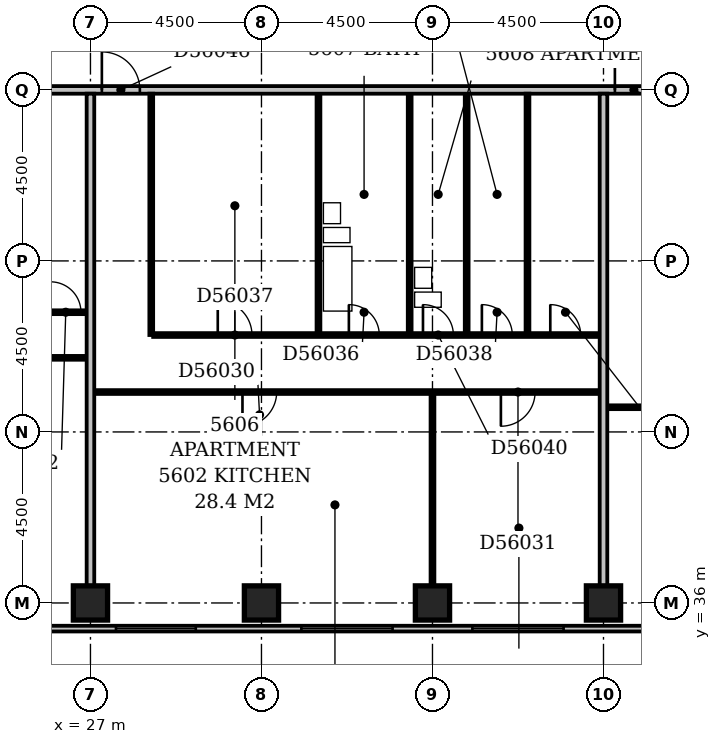
"""IFC4 building model, lengths in metres.
Left out: names, types, materials, properties, quantities, classifications, styles, units other than length and angle.
Written with IfcOpenShell. Run it as: python <this file> out.ifc"""

import sys

from ifc_helpers import new_model, si_unit, direction, frame, frame_2d, origin, origin_2d, place, context, subcontext, project, spatial, rectangle, extrude, element, fill, save


model = new_model("IFC4")
c1 = context("Model", 3, precision=1e-05, world=origin(), true_north=direction((0.0, 1.0)))
c2 = subcontext(c1, "Body", "Model", "MODEL_VIEW")
j1 = project(units=[si_unit("LENGTHUNIT", "METRE"), si_unit("PLANEANGLEUNIT", "RADIAN")], contexts=[c1])
p1 = place(None, origin())
s1 = spatial("IfcSite", under=j1, at=p1, CompositionType="ELEMENT")
p2 = place(p1, origin())
s2 = spatial("IfcBuilding", under=s1, at=p2, CompositionType="ELEMENT")
p3 = place(p2, frame((0.0, 0.0, 218.6)))
s3 = spatial("IfcBuildingStorey", under=s2, at=p3, CompositionType="ELEMENT", Elevation=218.6)
for number, where, z_axis, x_axis in (
    (1, (27.0, 36.0, -0.3), (0.0, 0.0, 1.0), (1.0, 0.0, 0.0)),
    (2, (31.5, 36.0, -0.3), (0.0, 0.0, 1.0), (1.0, 0.0, 0.0)),
    (3, (36.0, 36.0, -0.3), (0.0, 0.0, 1.0), (1.0, 0.0, 0.0)),
    (4, (40.5, 36.0, -0.3), (0.0, 0.0, 1.0), (1.0, 0.0, 0.0)),
):
    element("IfcColumn", number, at=place(p3, frame(where, z_axis=z_axis, x_axis=x_axis)), inside=s3, PredefinedType="COLUMN", context=c2, shape_type="SweptSolid", body=[
        extrude(rectangle(XDim=0.9, YDim=0.9, at=origin_2d()), origin(), (0.0, 0.0, 1.0), 3.6),
    ])
p4 = place(p3, frame((23.1, 35.325, 0.0), z_axis=(0.0, 0.0, 1.0), x_axis=(1.0, 0.0, 0.0)))
e5 = element("IfcWall", 5, at=p4, inside=s3, PredefinedType="STANDARD", context=c2, shape_type="SweptSolid", body=[
    extrude(rectangle(XDim=27.15, YDim=0.15, at=frame_2d((13.575, 0.0))), origin(), (0.0, 0.0, 1.0), 2.7),
])
p5 = place(p4, frame((0.45, 0.0, 0.6)))
e6 = element("IfcOpeningElement", 6, at=p5, cuts=e5, PredefinedType="OPENING", context=c2, shape_type="SweptSolid", body=[
    extrude(rectangle(XDim=2.4, YDim=1.8, at=frame_2d((1.2, 0.9))), frame((0.0, 0.087, 0.0), z_axis=(0.0, -1.0, 0.0), x_axis=(1.0, 0.0, 0.0)), (0.0, 0.0, 1.0), 0.174),
])
p6 = place(p4, frame((4.571, 0.0, 0.6)))
e7 = element("IfcOpeningElement", 7, at=p6, cuts=e5, PredefinedType="OPENING", context=c2, shape_type="SweptSolid", body=[
    extrude(rectangle(XDim=2.1, YDim=1.8, at=frame_2d((1.05, 0.9))), frame((0.0, 0.087, 0.0), z_axis=(0.0, -1.0, 0.0), x_axis=(1.0, 0.0, 0.0)), (0.0, 0.0, 1.0), 0.174),
])
p7 = place(p4, frame((9.45, 0.0, 0.6)))
e8 = element("IfcOpeningElement", 8, at=p7, cuts=e5, PredefinedType="OPENING", context=c2, shape_type="SweptSolid", body=[
    extrude(rectangle(XDim=2.4, YDim=1.8, at=frame_2d((1.2, 0.9))), frame((0.0, 0.087, 0.0), z_axis=(0.0, -1.0, 0.0), x_axis=(1.0, 0.0, 0.0)), (0.0, 0.0, 1.0), 0.174),
])
p8 = place(p4, frame((13.95, 0.0, 0.6)))
e9 = element("IfcOpeningElement", 9, at=p8, cuts=e5, PredefinedType="OPENING", context=c2, shape_type="SweptSolid", body=[
    extrude(rectangle(XDim=2.4, YDim=1.8, at=frame_2d((1.2, 0.9))), frame((0.0, 0.087, 0.0), z_axis=(0.0, -1.0, 0.0), x_axis=(1.0, 0.0, 0.0)), (0.0, 0.0, 1.0), 0.174),
])
p9 = place(p4, frame((19.657, 0.0, 0.6)))
e10 = element("IfcOpeningElement", 10, at=p9, cuts=e5, PredefinedType="OPENING", context=c2, shape_type="SweptSolid", body=[
    extrude(rectangle(XDim=1.5, YDim=1.8, at=frame_2d((0.75, 0.9))), frame((0.0, 0.087, 0.0), z_axis=(0.0, -1.0, 0.0), x_axis=(1.0, 0.0, 0.0)), (0.0, 0.0, 1.0), 0.174),
])
p10 = place(p4, frame((22.95, 0.0, 0.6)))
e11 = element("IfcOpeningElement", 11, at=p10, cuts=e5, PredefinedType="OPENING", context=c2, shape_type="SweptSolid", body=[
    extrude(rectangle(XDim=2.4, YDim=1.8, at=frame_2d((1.2, 0.9))), frame((0.0, 0.087, 0.0), z_axis=(0.0, -1.0, 0.0), x_axis=(1.0, 0.0, 0.0)), (0.0, 0.0, 1.0), 0.174),
])
p11 = place(p3, frame((27.0, 36.45, 0.0), z_axis=(0.0, 0.0, 1.0), x_axis=(0.0, 1.0, 0.0)))
e12 = element("IfcWall", 12, at=p11, inside=s3, PredefinedType="PARTITIONING", context=c2, shape_type="SweptSolid", body=[
    extrude(rectangle(XDim=12.95, YDim=0.2, at=frame_2d((6.475, 0.0))), origin(), (0.0, 0.0, 1.0), 2.4),
])
p12 = place(p3, frame((36.0, 36.45, 0.0), z_axis=(0.0, 0.0, 1.0), x_axis=(0.0, 1.0, 0.0)))
e13 = element("IfcWall", 13, at=p12, inside=s3, PredefinedType="PARTITIONING", context=c2, shape_type="SweptSolid", body=[
    extrude(rectangle(XDim=5.05, YDim=0.1, at=frame_2d((2.525, 0.0))), origin(), (0.0, 0.0, 1.0), 2.4),
])
p13 = place(p3, frame((40.5, 36.45, 0.0), z_axis=(0.0, 0.0, 1.0), x_axis=(0.0, 1.0, 0.0)))
e14 = element("IfcWall", 14, at=p13, inside=s3, PredefinedType="PARTITIONING", context=c2, shape_type="SweptSolid", body=[
    extrude(rectangle(XDim=12.95, YDim=0.2, at=frame_2d((6.475, 0.0))), origin(), (0.0, 0.0, 1.0), 3.3),
])
p14 = place(p3, frame((40.6, 41.15, 0.0), z_axis=(0.0, 0.0, 1.0), x_axis=(1.0, 0.0, 0.0)))
e15 = element("IfcWall", 15, at=p14, inside=s3, PredefinedType="PARTITIONING", context=c2, shape_type="SweptSolid", body=[
    extrude(rectangle(XDim=8.8, YDim=0.1, at=frame_2d((4.4, 0.0))), origin(), (0.0, 0.0, 1.0), 3.3),
])
p15 = place(p14, frame((1.7, 0.0, 0.0)))
e16 = element("IfcOpeningElement", 16, at=p15, cuts=e15, PredefinedType="OPENING", context=c2, shape_type="SweptSolid", body=[
    extrude(rectangle(XDim=0.9, YDim=2.1, at=frame_2d((0.45, 1.05))), frame((0.0, 0.062, 0.0), z_axis=(0.0, -1.0, 0.0), x_axis=(1.0, 0.0, 0.0)), (0.0, 0.0, 1.0), 0.124),
])
p16 = place(p14, frame((6.2, 0.0, 0.0)))
e17 = element("IfcOpeningElement", 17, at=p16, cuts=e15, PredefinedType="OPENING", context=c2, shape_type="SweptSolid", body=[
    extrude(rectangle(XDim=0.9, YDim=2.1, at=frame_2d((0.45, 1.05))), frame((0.0, 0.062, 0.0), z_axis=(0.0, -1.0, 0.0), x_axis=(1.0, 0.0, 0.0)), (0.0, 0.0, 1.0), 0.124),
])
p17 = place(p3, frame((27.1, 41.55, 0.0), z_axis=(0.0, 0.0, 1.0), x_axis=(1.0, 0.0, 0.0)))
e18 = element("IfcWall", 18, at=p17, inside=s3, PredefinedType="PARTITIONING", context=c2, shape_type="SweptSolid", body=[
    extrude(rectangle(XDim=13.3, YDim=0.1, at=frame_2d((6.65, 0.0))), origin(), (0.0, 0.0, 1.0), 3.3),
])
p18 = place(p17, frame((3.9, 0.0, 0.0)))
e19 = element("IfcOpeningElement", 19, at=p18, cuts=e18, PredefinedType="OPENING", context=c2, shape_type="SweptSolid", body=[
    extrude(rectangle(XDim=0.9, YDim=2.1, at=frame_2d((0.45, 1.05))), frame((0.0, 0.062, 0.0), z_axis=(0.0, -1.0, 0.0), x_axis=(1.0, 0.0, 0.0)), (0.0, 0.0, 1.0), 0.124),
])
p19 = place(p17, frame((10.7, 0.0, 0.0)))
e20 = element("IfcOpeningElement", 20, at=p19, cuts=e18, PredefinedType="OPENING", context=c2, shape_type="SweptSolid", body=[
    extrude(rectangle(XDim=0.9, YDim=2.1, at=frame_2d((0.45, 1.05))), frame((0.0, 0.062, 0.0), z_axis=(0.0, -1.0, 0.0), x_axis=(1.0, 0.0, 0.0)), (0.0, 0.0, 1.0), 0.124),
])
p20 = place(p3, frame((22.6, 42.45, 0.0), z_axis=(0.0, 0.0, 1.0), x_axis=(1.0, 0.0, 0.0)))
e21 = element("IfcWall", 21, at=p20, inside=s3, PredefinedType="PARTITIONING", context=c2, shape_type="SweptSolid", body=[
    extrude(rectangle(XDim=4.3, YDim=0.1, at=frame_2d((2.15, 0.0))), origin(), (0.0, 0.0, 1.0), 3.3),
])
p21 = place(p20, frame((1.7, 0.0, 0.0)))
e22 = element("IfcOpeningElement", 22, at=p21, cuts=e21, PredefinedType="OPENING", context=c2, shape_type="SweptSolid", body=[
    extrude(rectangle(XDim=0.9, YDim=2.1, at=frame_2d((0.45, 1.05))), frame((0.0, 0.062, 0.0), z_axis=(0.0, -1.0, 0.0), x_axis=(1.0, 0.0, 0.0)), (0.0, 0.0, 1.0), 0.124),
])
p22 = place(p3, frame((28.6, 43.05, 0.0), z_axis=(0.0, 0.0, 1.0), x_axis=(0.0, 1.0, 0.0)))
e23 = element("IfcWall", 23, at=p22, inside=s3, PredefinedType="PARTITIONING", context=c2, shape_type="SweptSolid", body=[
    extrude(rectangle(XDim=6.35, YDim=0.1, at=frame_2d((3.175, 0.0))), origin(), (0.0, 0.0, 1.0), 3.3),
])
p23 = place(p3, frame((28.65, 43.05, 0.0), z_axis=(0.0, 0.0, 1.0), x_axis=(1.0, 0.0, 0.0)))
e24 = element("IfcWall", 24, at=p23, inside=s3, PredefinedType="PARTITIONING", context=c2, shape_type="SweptSolid", body=[
    extrude(rectangle(XDim=11.75, YDim=0.1, at=frame_2d((5.875, 0.0))), origin(), (0.0, 0.0, 1.0), 3.3),
])
p24 = place(p23, frame((5.15, 0.0, 0.0)))
e25 = element("IfcOpeningElement", 25, at=p24, cuts=e24, PredefinedType="OPENING", context=c2, shape_type="SweptSolid", body=[
    extrude(rectangle(XDim=0.8, YDim=2.1, at=frame_2d((0.4, 1.05))), frame((0.0, 0.062, 0.0), z_axis=(0.0, -1.0, 0.0), x_axis=(1.0, 0.0, 0.0)), (0.0, 0.0, 1.0), 0.124),
])
p25 = place(p23, frame((1.7, 0.0, 0.0)))
e26 = element("IfcOpeningElement", 26, at=p25, cuts=e24, PredefinedType="OPENING", context=c2, shape_type="SweptSolid", body=[
    extrude(rectangle(XDim=0.9, YDim=2.1, at=frame_2d((0.45, 1.05))), frame((0.0, 0.062, 0.0), z_axis=(0.0, -1.0, 0.0), x_axis=(1.0, 0.0, 0.0)), (0.0, 0.0, 1.0), 0.124),
])
p26 = place(p23, frame((8.65, 0.0, 0.0)))
e27 = element("IfcOpeningElement", 27, at=p26, cuts=e24, PredefinedType="OPENING", context=c2, shape_type="SweptSolid", body=[
    extrude(rectangle(XDim=0.8, YDim=2.1, at=frame_2d((0.4, 1.05))), frame((0.0, 0.062, 0.0), z_axis=(0.0, -1.0, 0.0), x_axis=(1.0, 0.0, 0.0)), (0.0, 0.0, 1.0), 0.124),
])
p27 = place(p23, frame((10.45, 0.0, 0.0)))
e28 = element("IfcOpeningElement", 28, at=p27, cuts=e24, PredefinedType="OPENING", context=c2, shape_type="SweptSolid", body=[
    extrude(rectangle(XDim=0.8, YDim=2.1, at=frame_2d((0.4, 1.05))), frame((0.0, 0.062, 0.0), z_axis=(0.0, -1.0, 0.0), x_axis=(1.0, 0.0, 0.0)), (0.0, 0.0, 1.0), 0.124),
])
p28 = place(p23, frame((7.1, 0.0, 0.0)))
e29 = element("IfcOpeningElement", 29, at=p28, cuts=e24, PredefinedType="OPENING", context=c2, shape_type="SweptSolid", body=[
    extrude(rectangle(XDim=0.8, YDim=2.1, at=frame_2d((0.4, 1.05))), frame((0.0, 0.062, 0.0), z_axis=(0.0, -1.0, 0.0), x_axis=(1.0, 0.0, 0.0)), (0.0, 0.0, 1.0), 0.124),
])
p29 = place(p3, frame((33.0, 43.1, 0.0), z_axis=(0.0, 0.0, 1.0), x_axis=(0.0, 1.0, 0.0)))
e30 = element("IfcWall", 30, at=p29, inside=s3, PredefinedType="PLUMBINGWALL", context=c2, shape_type="SweptSolid", body=[
    extrude(rectangle(XDim=6.3, YDim=0.1, at=frame_2d((3.15, 0.0))), origin(), (0.0, 0.0, 1.0), 3.3),
])
p30 = place(p3, frame((35.4, 43.1, 0.0), z_axis=(0.0, 0.0, 1.0), x_axis=(0.0, 1.0, 0.0)))
e31 = element("IfcWall", 31, at=p30, inside=s3, PredefinedType="PLUMBINGWALL", context=c2, shape_type="SweptSolid", body=[
    extrude(rectangle(XDim=6.3, YDim=0.1, at=frame_2d((3.15, 0.0))), origin(), (0.0, 0.0, 1.0), 2.4),
])
p31 = place(p3, frame((36.9, 43.1, 0.0), z_axis=(0.0, 0.0, 1.0), x_axis=(0.0, 1.0, 0.0)))
e32 = element("IfcWall", 32, at=p31, inside=s3, PredefinedType="PLUMBINGWALL", context=c2, shape_type="SweptSolid", body=[
    extrude(rectangle(XDim=6.3, YDim=0.1, at=frame_2d((3.15, 0.0))), origin(), (0.0, 0.0, 1.0), 3.3),
])
p32 = place(p3, frame((38.5, 43.1, 0.0), z_axis=(0.0, 0.0, 1.0), x_axis=(0.0, 1.0, 0.0)))
e33 = element("IfcWall", 33, at=p32, inside=s3, PredefinedType="PARTITIONING", context=c2, shape_type="SweptSolid", body=[
    extrude(rectangle(XDim=6.3, YDim=0.1, at=frame_2d((3.15, 0.0))), origin(), (0.0, 0.0, 1.0), 3.3),
])
p33 = place(p3, frame((25.75, 43.65, 0.0), z_axis=(0.0, 0.0, 1.0), x_axis=(1.0, 0.0, 0.0)))
e34 = element("IfcWall", 34, at=p33, inside=s3, PredefinedType="PARTITIONING", context=c2, shape_type="SweptSolid", body=[
    extrude(rectangle(XDim=1.15, YDim=0.1, at=frame_2d((0.575, 0.0))), origin(), (0.0, 0.0, 1.0), 3.3),
])
p34 = place(p33, frame((0.2, 0.0, 0.0)))
e35 = element("IfcOpeningElement", 35, at=p34, cuts=e34, PredefinedType="OPENING", context=c2, shape_type="SweptSolid", body=[
    extrude(rectangle(XDim=0.8, YDim=2.1, at=frame_2d((0.4, 1.05))), frame((0.0, 0.062, 0.0), z_axis=(0.0, -1.0, 0.0), x_axis=(1.0, 0.0, 0.0)), (0.0, 0.0, 1.0), 0.124),
])
p35 = place(p3, frame((22.6, 49.5, 0.0), z_axis=(0.0, 0.0, 1.0), x_axis=(1.0, 0.0, 0.0)))
e36 = element("IfcWall", 36, at=p35, inside=s3, PredefinedType="PARTITIONING", context=c2, shape_type="SweptSolid", body=[
    extrude(rectangle(XDim=30.95, YDim=0.2, at=frame_2d((15.475, 0.0))), origin(), (0.0, 0.0, 1.0), 3.3),
])
p36 = place(p35, frame((1.85, 0.0, 0.0)))
e37 = element("IfcOpeningElement", 37, at=p36, cuts=e36, PredefinedType="OPENING", context=c2, shape_type="SweptSolid", body=[
    extrude(rectangle(XDim=1.0, YDim=2.1, at=frame_2d((0.5, 1.05))), frame((0.0, 0.112, 0.0), z_axis=(0.0, -1.0, 0.0), x_axis=(1.0, 0.0, 0.0)), (0.0, 0.0, 1.0), 0.224),
])
p37 = place(p35, frame((4.7, 0.0, 0.0)))
e38 = element("IfcOpeningElement", 38, at=p37, cuts=e36, PredefinedType="OPENING", context=c2, shape_type="SweptSolid", body=[
    extrude(rectangle(XDim=1.0, YDim=2.1, at=frame_2d((0.5, 1.05))), frame((0.0, 0.112, 0.0), z_axis=(0.0, -1.0, 0.0), x_axis=(1.0, 0.0, 0.0)), (0.0, 0.0, 1.0), 0.224),
])
p38 = place(p35, frame((18.2, 0.0, 0.0)))
e39 = element("IfcOpeningElement", 39, at=p38, cuts=e36, PredefinedType="OPENING", context=c2, shape_type="SweptSolid", body=[
    extrude(rectangle(XDim=1.0, YDim=2.1, at=frame_2d((0.5, 1.05))), frame((0.0, 0.112, 0.0), z_axis=(0.0, -1.0, 0.0), x_axis=(1.0, 0.0, 0.0)), (0.0, 0.0, 1.0), 0.224),
])
p39 = place(p35, frame((27.15, 0.0, 0.0)))
e40 = element("IfcOpeningElement", 40, at=p39, cuts=e36, PredefinedType="OPENING", context=c2, shape_type="SweptSolid", body=[
    extrude(rectangle(XDim=1.0, YDim=2.1, at=frame_2d((0.5, 1.05))), frame((0.0, 0.112, 0.0), z_axis=(0.0, -1.0, 0.0), x_axis=(1.0, 0.0, 0.0)), (0.0, 0.0, 1.0), 0.224),
])
p40 = place(p6, origin())
e41 = element("IfcWindow", 41, at=p40, inside=s3, PartitioningType="SINGLE_PANEL", PredefinedType="WINDOW", context=c2, shape_type="SweptSolid", body=[
    extrude(rectangle(XDim=2.1, YDim=1.8, at=frame_2d((1.05, 0.9))), frame((0.0, 0.03, 0.0), z_axis=(0.0, -1.0, 0.0), x_axis=(1.0, 0.0, 0.0)), (0.0, 0.0, 1.0), 0.06),
])
fill(e7, e41)
p41 = place(p7, origin())
e42 = element("IfcWindow", 42, at=p41, inside=s3, PartitioningType="SINGLE_PANEL", PredefinedType="WINDOW", context=c2, shape_type="SweptSolid", body=[
    extrude(rectangle(XDim=2.4, YDim=1.8, at=frame_2d((1.2, 0.9))), frame((0.0, 0.03, 0.0), z_axis=(0.0, -1.0, 0.0), x_axis=(1.0, 0.0, 0.0)), (0.0, 0.0, 1.0), 0.06),
])
fill(e8, e42)
p42 = place(p8, origin())
e43 = element("IfcWindow", 43, at=p42, inside=s3, PartitioningType="SINGLE_PANEL", PredefinedType="WINDOW", context=c2, shape_type="SweptSolid", body=[
    extrude(rectangle(XDim=2.4, YDim=1.8, at=frame_2d((1.2, 0.9))), frame((0.0, 0.03, 0.0), z_axis=(0.0, -1.0, 0.0), x_axis=(1.0, 0.0, 0.0)), (0.0, 0.0, 1.0), 0.06),
])
fill(e9, e43)
p43 = place(p18, frame((0.9, 0.0, 0.0), z_axis=(0.0, 0.0, 1.0), x_axis=(-1.0, 0.0, 0.0)))
e44 = element("IfcDoor", 44, at=p43, inside=s3, OperationType="SINGLE_SWING_RIGHT", PredefinedType="DOOR", context=c2, shape_type="SweptSolid", body=[
    extrude(rectangle(XDim=0.9, YDim=2.1, at=frame_2d((0.45, 1.05))), frame((0.0, 0.025, 0.0), z_axis=(0.0, -1.0, 0.0), x_axis=(1.0, 0.0, 0.0)), (0.0, 0.0, 1.0), 0.05),
])
fill(e19, e44)
p44 = place(p19, frame((0.9, 0.0, 0.0), z_axis=(0.0, 0.0, 1.0), x_axis=(-1.0, 0.0, 0.0)))
e45 = element("IfcDoor", 45, at=p44, inside=s3, OperationType="SINGLE_SWING_RIGHT", PredefinedType="DOOR", context=c2, shape_type="SweptSolid", body=[
    extrude(rectangle(XDim=0.9, YDim=2.1, at=frame_2d((0.45, 1.05))), frame((0.0, 0.025, 0.0), z_axis=(0.0, -1.0, 0.0), x_axis=(1.0, 0.0, 0.0)), (0.0, 0.0, 1.0), 0.05),
])
fill(e20, e45)
p45 = place(p24, origin())
e46 = element("IfcDoor", 46, at=p45, inside=s3, OperationType="SINGLE_SWING_LEFT", PredefinedType="DOOR", context=c2, shape_type="SweptSolid", body=[
    extrude(rectangle(XDim=0.8, YDim=2.1, at=frame_2d((0.4, 1.05))), frame((0.0, 0.025, 0.0), z_axis=(0.0, -1.0, 0.0), x_axis=(1.0, 0.0, 0.0)), (0.0, 0.0, 1.0), 0.05),
])
fill(e25, e46)
p46 = place(p25, origin())
e47 = element("IfcDoor", 47, at=p46, inside=s3, OperationType="SINGLE_SWING_LEFT", PredefinedType="DOOR", context=c2, shape_type="SweptSolid", body=[
    extrude(rectangle(XDim=0.9, YDim=2.1, at=frame_2d((0.45, 1.05))), frame((0.0, 0.025, 0.0), z_axis=(0.0, -1.0, 0.0), x_axis=(1.0, 0.0, 0.0)), (0.0, 0.0, 1.0), 0.05),
])
fill(e26, e47)
p47 = place(p26, origin())
e48 = element("IfcDoor", 48, at=p47, inside=s3, OperationType="SINGLE_SWING_LEFT", PredefinedType="DOOR", context=c2, shape_type="SweptSolid", body=[
    extrude(rectangle(XDim=0.8, YDim=2.1, at=frame_2d((0.4, 1.05))), frame((0.0, 0.025, 0.0), z_axis=(0.0, -1.0, 0.0), x_axis=(1.0, 0.0, 0.0)), (0.0, 0.0, 1.0), 0.05),
])
fill(e27, e48)
p48 = place(p27, origin())
e49 = element("IfcDoor", 49, at=p48, inside=s3, OperationType="SINGLE_SWING_LEFT", PredefinedType="DOOR", context=c2, shape_type="SweptSolid", body=[
    extrude(rectangle(XDim=0.8, YDim=2.1, at=frame_2d((0.4, 1.05))), frame((0.0, 0.025, 0.0), z_axis=(0.0, -1.0, 0.0), x_axis=(1.0, 0.0, 0.0)), (0.0, 0.0, 1.0), 0.05),
])
fill(e28, e49)
p49 = place(p28, origin())
e50 = element("IfcDoor", 50, at=p49, inside=s3, OperationType="SINGLE_SWING_LEFT", PredefinedType="DOOR", context=c2, shape_type="SweptSolid", body=[
    extrude(rectangle(XDim=0.8, YDim=2.1, at=frame_2d((0.4, 1.05))), frame((0.0, 0.025, 0.0), z_axis=(0.0, -1.0, 0.0), x_axis=(1.0, 0.0, 0.0)), (0.0, 0.0, 1.0), 0.05),
])
fill(e29, e50)
p50 = place(p34, origin())
e51 = element("IfcDoor", 51, at=p50, inside=s3, OperationType="SINGLE_SWING_LEFT", PredefinedType="DOOR", context=c2, shape_type="SweptSolid", body=[
    extrude(rectangle(XDim=0.8, YDim=2.1, at=frame_2d((0.4, 1.05))), frame((0.0, 0.025, 0.0), z_axis=(0.0, -1.0, 0.0), x_axis=(1.0, 0.0, 0.0)), (0.0, 0.0, 1.0), 0.05),
])
fill(e35, e51)
p51 = place(p37, origin())
e52 = element("IfcDoor", 52, at=p51, inside=s3, OperationType="SINGLE_SWING_LEFT", PredefinedType="DOOR", context=c2, shape_type="SweptSolid", body=[
    extrude(rectangle(XDim=1.0, YDim=2.1, at=frame_2d((0.5, 1.05))), frame((0.0, 0.025, 0.0), z_axis=(0.0, -1.0, 0.0), x_axis=(1.0, 0.0, 0.0)), (0.0, 0.0, 1.0), 0.05),
])
fill(e38, e52)
p52 = place(p38, origin())
e53 = element("IfcDoor", 53, at=p52, inside=s3, OperationType="SINGLE_SWING_LEFT", PredefinedType="DOOR", context=c2, shape_type="SweptSolid", body=[
    extrude(rectangle(XDim=1.0, YDim=2.1, at=frame_2d((0.5, 1.05))), frame((0.0, 0.025, 0.0), z_axis=(0.0, -1.0, 0.0), x_axis=(1.0, 0.0, 0.0)), (0.0, 0.0, 1.0), 0.05),
])
fill(e39, e53)
save(model, sys.argv[1])
